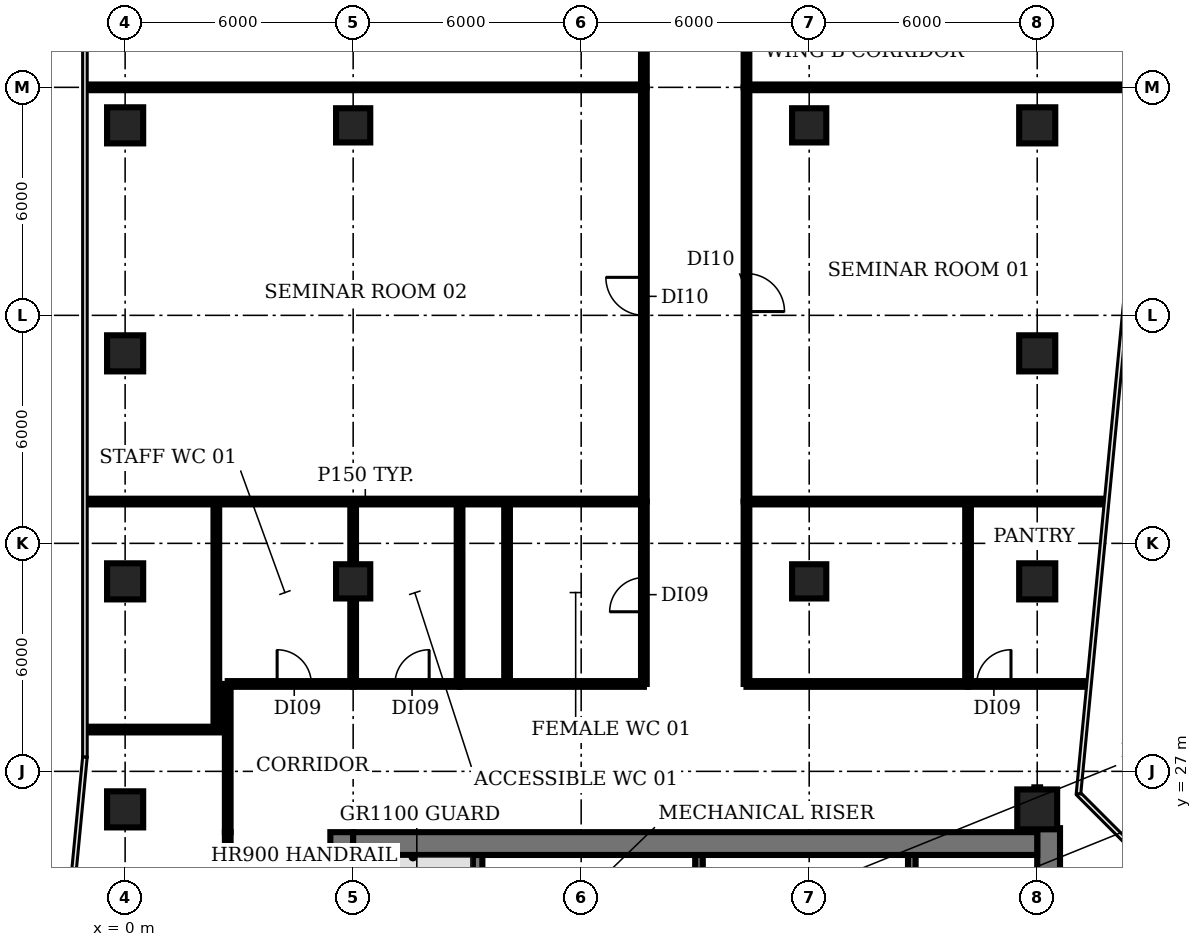
"""IFC4 building model, lengths in metres.
Left out: names, types, materials, properties, quantities, classifications, styles, units other than length and angle.
Written with IfcOpenShell. Run it as: python <this file> out.ifc"""

import sys

from ifc_helpers import new_model, si_unit, direction, frame, frame_2d, origin, origin_2d, place, context, subcontext, project, spatial, rectangle, circle, extrude, element, fill, save


model = new_model("IFC4")
c1 = context("Model", 3, precision=1e-05, world=origin(), true_north=direction((0.0, 1.0)))
c2 = subcontext(c1, "Body", "Model", "MODEL_VIEW")
j1 = project(units=[si_unit("LENGTHUNIT", "METRE"), si_unit("PLANEANGLEUNIT", "RADIAN")], contexts=[c1])
p1 = place(None, origin())
s1 = spatial("IfcSite", under=j1, at=p1, CompositionType="ELEMENT")
p2 = place(p1, origin())
s2 = spatial("IfcBuilding", under=s1, at=p2, CompositionType="ELEMENT")
p3 = place(p2, frame((0.0, 0.0, 146.6)))
s3 = spatial("IfcBuildingStorey", under=s2, at=p3, CompositionType="ELEMENT", Elevation=146.6)
for number, where, z_axis, x_axis in (
    (1, (0.0, 26.0, -0.35), (0.0, 0.0, 1.0), (1.0, 0.0, 0.0)),
    (2, (0.0, 32.0, -0.35), (0.0, 0.0, 1.0), (1.0, 0.0, 0.0)),
    (3, (0.0, 38.0, -0.35), (0.0, 0.0, 1.0), (1.0, 0.0, 0.0)),
    (4, (0.0, 44.0, -0.35), (0.0, 0.0, 1.0), (1.0, 0.0, 0.0)),
):
    element("IfcColumn", number, at=place(p3, frame(where, z_axis=z_axis, x_axis=x_axis)), inside=s3, PredefinedType="COLUMN", context=c2, shape_type="SweptSolid", body=[
        extrude(rectangle(XDim=0.95, YDim=0.95, at=origin_2d()), origin(), (0.0, 0.0, 1.0), 4.2),
    ])
for number, where, z_axis, x_axis in (
    (5, (6.0, 32.0, -0.35), (0.0, 0.0, 1.0), (1.0, 0.0, 0.0)),
    (6, (6.0, 44.0, -0.35), (0.0, 0.0, 1.0), (1.0, 0.0, 0.0)),
    (7, (18.0, 32.0, -0.35), (0.0, 0.0, 1.0), (1.0, 0.0, 0.0)),
    (8, (18.0, 44.0, -0.35), (0.0, 0.0, 1.0), (1.0, 0.0, 0.0)),
):
    element("IfcColumn", number, at=place(p3, frame(where, z_axis=z_axis, x_axis=x_axis)), inside=s3, PredefinedType="COLUMN", context=c2, shape_type="SweptSolid", body=[
        extrude(rectangle(XDim=0.9, YDim=0.9, at=origin_2d()), origin(), (0.0, 0.0, 1.0), 4.2),
    ])
p4 = place(p3, frame((24.0, 26.0, -0.35), z_axis=(0.0, 0.0, 1.0), x_axis=(1.0, 0.0, 0.0)))
e9 = element("IfcColumn", 9, at=p4, inside=s3, PredefinedType="COLUMN", context=c2, shape_type="SweptSolid", body=[
    extrude(circle(Radius=0.525, at=origin_2d()), origin(), (0.0, 0.0, 1.0), 4.2),
])
for number, where, z_axis, x_axis in (
    (10, (24.0, 32.0, -0.35), (0.0, 0.0, 1.0), (1.0, 0.0, 0.0)),
    (11, (24.0, 38.0, -0.35), (0.0, 0.0, 1.0), (1.0, 0.0, 0.0)),
    (12, (24.0, 44.0, -0.35), (0.0, 0.0, 1.0), (1.0, 0.0, 0.0)),
):
    element("IfcColumn", number, at=place(p3, frame(where, z_axis=z_axis, x_axis=x_axis)), inside=s3, PredefinedType="COLUMN", context=c2, shape_type="SweptSolid", body=[
        extrude(rectangle(XDim=0.95, YDim=0.95, at=origin_2d()), origin(), (0.0, 0.0, 1.0), 4.2),
    ])
p5 = place(p3, frame((9.275, 18.375, 0.0), z_axis=(0.0, 0.0, 1.0), x_axis=(0.0, 1.0, 0.0)))
e13 = element("IfcWall", 13, at=p5, inside=s3, PredefinedType="SHEAR", context=c2, shape_type="SweptSolid", body=[
    extrude(rectangle(XDim=6.425, YDim=0.25, at=frame_2d((3.212, 0.0))), origin(), (0.0, 0.0, 1.0), 3.85),
])
for number, where, z_axis, x_axis in (
    (14, (15.1, 22.9, 0.0), (0.0, 0.0, 1.0), (0.0, 1.0, 0.0)),
    (15, (20.7, 22.9, 0.0), (0.0, 0.0, 1.0), (0.0, 1.0, 0.0)),
):
    element("IfcWall", number, at=place(p3, frame(where, z_axis=z_axis, x_axis=x_axis)), inside=s3, PredefinedType="SHEAR", context=c2, shape_type="SweptSolid", body=[
        extrude(rectangle(XDim=1.9, YDim=0.2, at=frame_2d((0.95, 0.0))), origin(), (0.0, 0.0, 1.0), 3.85),
    ])
p6 = place(p3, frame((5.7, 4.8, 0.0), z_axis=(0.0, 0.0, 1.0), x_axis=(0.0, 1.0, 0.0)))
e16 = element("IfcWall", 16, at=p6, inside=s3, PredefinedType="SHEAR", context=c2, shape_type="SweptSolid", body=[
    extrude(rectangle(XDim=20.6, YDim=0.6, at=frame_2d((10.3, 0.0))), origin(), (0.0, 0.0, 1.0), 3.85),
])
p7 = place(p6, frame((0.85, 0.0, 0.0)))
e17 = element("IfcOpeningElement", 17, at=p7, cuts=e16, PredefinedType="OPENING", context=c2, shape_type="SweptSolid", body=[
    extrude(rectangle(XDim=1.5, YDim=2.1, at=frame_2d((0.75, 1.05))), frame((0.0, 0.31, 0.0), z_axis=(0.0, -1.0, 0.0), x_axis=(1.0, 0.0, 0.0)), (0.0, 0.0, 1.0), 0.62),
])
p8 = place(p6, frame((7.3, 0.0, 0.0)))
e18 = element("IfcOpeningElement", 18, at=p8, cuts=e16, PredefinedType="OPENING", context=c2, shape_type="SweptSolid", body=[
    extrude(rectangle(XDim=1.2, YDim=2.1, at=frame_2d((0.6, 1.05))), frame((0.0, 0.31, 0.0), z_axis=(0.0, -1.0, 0.0), x_axis=(1.0, 0.0, 0.0)), (0.0, 0.0, 1.0), 0.62),
])
p9 = place(p6, frame((13.85, 0.0, 0.0)))
e19 = element("IfcOpeningElement", 19, at=p9, cuts=e16, PredefinedType="OPENING", context=c2, shape_type="SweptSolid", body=[
    extrude(rectangle(XDim=1.2, YDim=2.1, at=frame_2d((0.6, 1.05))), frame((0.0, 0.31, 0.0), z_axis=(0.0, -1.0, 0.0), x_axis=(1.0, 0.0, 0.0)), (0.0, 0.0, 1.0), 0.62),
])
p10 = place(p3, frame((24.3, 25.505, 0.0), z_axis=(0.0, 0.0, 1.0), x_axis=(0.0, -1.0, 0.0)))
e20 = element("IfcWall", 20, at=p10, inside=s3, PredefinedType="SHEAR", context=c2, shape_type="SweptSolid", body=[
    extrude(rectangle(XDim=20.705, YDim=0.6, at=frame_2d((10.353, 0.0))), origin(), (0.0, 0.0, 1.0), 3.85),
])
p11 = place(p10, frame((18.355, 0.0, 0.0)))
e21 = element("IfcOpeningElement", 21, at=p11, cuts=e20, PredefinedType="OPENING", context=c2, shape_type="SweptSolid", body=[
    extrude(rectangle(XDim=1.5, YDim=2.1, at=frame_2d((0.75, 1.05))), frame((0.0, 0.31, 0.0), z_axis=(0.0, -1.0, 0.0), x_axis=(1.0, 0.0, 0.0)), (0.0, 0.0, 1.0), 0.62),
])
p12 = place(p10, frame((12.255, 0.0, 0.0)))
e22 = element("IfcOpeningElement", 22, at=p12, cuts=e20, PredefinedType="OPENING", context=c2, shape_type="SweptSolid", body=[
    extrude(rectangle(XDim=0.9, YDim=2.1, at=frame_2d((0.45, 1.05))), frame((0.0, 0.31, 0.0), z_axis=(0.0, -1.0, 0.0), x_axis=(1.0, 0.0, 0.0)), (0.0, 0.0, 1.0), 0.62),
])
p13 = place(p10, frame((6.255, 0.0, 0.0)))
e23 = element("IfcOpeningElement", 23, at=p13, cuts=e20, PredefinedType="OPENING", context=c2, shape_type="SweptSolid", body=[
    extrude(rectangle(XDim=2.0, YDim=2.1, at=frame_2d((1.0, 1.05))), frame((0.0, 0.31, 0.0), z_axis=(0.0, -1.0, 0.0), x_axis=(1.0, 0.0, 0.0)), (0.0, 0.0, 1.0), 0.62),
])
p14 = place(p3, frame((6.0, 25.1, 0.0), z_axis=(0.0, 0.0, 1.0), x_axis=(1.0, 0.0, 0.0)))
e24 = element("IfcWall", 24, at=p14, inside=s3, PredefinedType="SHEAR", context=c2, shape_type="SweptSolid", body=[
    extrude(rectangle(XDim=18.0, YDim=0.6, at=frame_2d((9.0, 0.0))), origin(), (0.0, 0.0, 1.0), 3.85),
])
for number, where, z_axis, x_axis in (
    (25, (-1.01, 34.1, 0.0), (0.0, 0.0, 1.0), (1.0, 0.0, 0.0)),
    (26, (-1.01, 45.0, 0.0), (0.0, 0.0, 1.0), (1.0, 0.0, 0.0)),
):
    element("IfcWall", number, at=place(p3, frame(where, z_axis=z_axis, x_axis=x_axis)), inside=s3, PredefinedType="PARTITIONING", context=c2, shape_type="SweptSolid", body=[
        extrude(rectangle(XDim=14.66, YDim=0.15, at=frame_2d((7.33, 0.0))), origin(), (0.0, 0.0, 1.0), 2.88),
    ])
p15 = place(p3, frame((-0.998, 28.1, 0.0), z_axis=(0.0, 0.0, 1.0), x_axis=(1.0, 0.0, 0.0)))
e27 = element("IfcWall", 27, at=p15, inside=s3, PredefinedType="PARTITIONING", context=c2, shape_type="SweptSolid", body=[
    extrude(rectangle(XDim=3.698, YDim=0.15, at=frame_2d((1.849, 0.0))), origin(), (0.0, 0.0, 1.0), 2.88),
])
p16 = place(p3, frame((2.4, 28.1, 0.0), z_axis=(0.0, 0.0, 1.0), x_axis=(0.0, 1.0, 0.0)))
e28 = element("IfcWall", 28, at=p16, inside=s3, PredefinedType="PARTITIONING", context=c2, shape_type="SweptSolid", body=[
    extrude(rectangle(XDim=6.0, YDim=0.15, at=frame_2d((3.0, 0.0))), origin(), (0.0, 0.0, 1.0), 2.88),
])
p17 = place(p3, frame((2.7, 4.8, 0.0), z_axis=(0.0, 0.0, 1.0), x_axis=(0.0, 1.0, 0.0)))
e29 = element("IfcWall", 29, at=p17, inside=s3, PredefinedType="PARTITIONING", context=c2, shape_type="SweptSolid", body=[
    extrude(rectangle(XDim=20.6, YDim=0.15, at=frame_2d((10.3, 0.0))), origin(), (0.0, 0.0, 1.0), 2.88),
])
p18 = place(p17, frame((10.2, 0.0, 0.0)))
e30 = element("IfcOpeningElement", 30, at=p18, cuts=e29, PredefinedType="OPENING", context=c2, shape_type="SweptSolid", body=[
    extrude(rectangle(XDim=1.2, YDim=2.1, at=frame_2d((0.6, 1.05))), frame((0.0, 0.085, 0.0), z_axis=(0.0, -1.0, 0.0), x_axis=(1.0, 0.0, 0.0)), (0.0, 0.0, 1.0), 0.17),
])
p19 = place(p3, frame((2.7, 25.4, 0.0), z_axis=(0.0, 0.0, 1.0), x_axis=(0.0, 1.0, 0.0)))
e31 = element("IfcWall", 31, at=p19, inside=s3, PredefinedType="PARTITIONING", context=c2, shape_type="SweptSolid", body=[
    extrude(rectangle(XDim=3.9, YDim=0.15, at=frame_2d((1.95, 0.0))), origin(), (0.0, 0.0, 1.0), 2.88),
])
p20 = place(p3, frame((2.7, 29.3, 0.0), z_axis=(0.0, 0.0, 1.0), x_axis=(1.0, 0.0, 0.0)))
e32 = element("IfcWall", 32, at=p20, inside=s3, PredefinedType="PARTITIONING", context=c2, shape_type="SweptSolid", body=[
    extrude(rectangle(XDim=3.3, YDim=0.15, at=frame_2d((1.65, 0.0))), origin(), (0.0, 0.0, 1.0), 2.88),
])
p21 = place(p20, frame((1.3, 0.0, 0.0)))
e33 = element("IfcOpeningElement", 33, at=p21, cuts=e32, PredefinedType="OPENING", context=c2, shape_type="SweptSolid", body=[
    extrude(rectangle(XDim=0.9, YDim=2.1, at=frame_2d((0.45, 1.05))), frame((0.0, 0.085, 0.0), z_axis=(0.0, -1.0, 0.0), x_axis=(1.0, 0.0, 0.0)), (0.0, 0.0, 1.0), 0.17),
])
p22 = place(p3, frame((6.0, 29.3, 0.0), z_axis=(0.0, 0.0, 1.0), x_axis=(0.0, 1.0, 0.0)))
e34 = element("IfcWall", 34, at=p22, inside=s3, PredefinedType="PARTITIONING", context=c2, shape_type="SweptSolid", body=[
    extrude(rectangle(XDim=4.8, YDim=0.15, at=frame_2d((2.4, 0.0))), origin(), (0.0, 0.0, 1.0), 2.88),
])
p23 = place(p3, frame((6.0, 29.3, 0.0), z_axis=(0.0, 0.0, 1.0), x_axis=(1.0, 0.0, 0.0)))
e35 = element("IfcWall", 35, at=p23, inside=s3, PredefinedType="PARTITIONING", context=c2, shape_type="SweptSolid", body=[
    extrude(rectangle(XDim=2.8, YDim=0.15, at=frame_2d((1.4, 0.0))), origin(), (0.0, 0.0, 1.0), 2.88),
])
p24 = place(p23, frame((1.1, 0.0, 0.0)))
e36 = element("IfcOpeningElement", 36, at=p24, cuts=e35, PredefinedType="OPENING", context=c2, shape_type="SweptSolid", body=[
    extrude(rectangle(XDim=0.9, YDim=2.1, at=frame_2d((0.45, 1.05))), frame((0.0, 0.085, 0.0), z_axis=(0.0, -1.0, 0.0), x_axis=(1.0, 0.0, 0.0)), (0.0, 0.0, 1.0), 0.17),
])
p25 = place(p3, frame((8.8, 29.3, 0.0), z_axis=(0.0, 0.0, 1.0), x_axis=(0.0, 1.0, 0.0)))
e37 = element("IfcWall", 37, at=p25, inside=s3, PredefinedType="PARTITIONING", context=c2, shape_type="SweptSolid", body=[
    extrude(rectangle(XDim=4.8, YDim=0.15, at=frame_2d((2.4, 0.0))), origin(), (0.0, 0.0, 1.0), 2.88),
])
p26 = place(p3, frame((8.8, 29.3, 0.0), z_axis=(0.0, 0.0, 1.0), x_axis=(1.0, 0.0, 0.0)))
e38 = element("IfcWall", 38, at=p26, inside=s3, PredefinedType="PARTITIONING", context=c2, shape_type="SweptSolid", body=[
    extrude(rectangle(XDim=4.85, YDim=0.15, at=frame_2d((2.425, 0.0))), origin(), (0.0, 0.0, 1.0), 2.88),
])
p27 = place(p3, frame((10.05, 29.3, 0.0), z_axis=(0.0, 0.0, 1.0), x_axis=(0.0, 1.0, 0.0)))
e39 = element("IfcWall", 39, at=p27, inside=s3, PredefinedType="PARTITIONING", context=c2, shape_type="SweptSolid", body=[
    extrude(rectangle(XDim=4.8, YDim=0.15, at=frame_2d((2.4, 0.0))), origin(), (0.0, 0.0, 1.0), 2.88),
])
p28 = place(p3, frame((13.65, 29.3, 0.0), z_axis=(0.0, 0.0, 1.0), x_axis=(0.0, 1.0, 0.0)))
e40 = element("IfcWall", 40, at=p28, inside=s3, PredefinedType="PARTITIONING", context=c2, shape_type="SweptSolid", body=[
    extrude(rectangle(XDim=4.8, YDim=0.15, at=frame_2d((2.4, 0.0))), origin(), (0.0, 0.0, 1.0), 2.88),
])
p29 = place(p28, frame((1.9, 0.0, 0.0)))
e41 = element("IfcOpeningElement", 41, at=p29, cuts=e40, PredefinedType="OPENING", context=c2, shape_type="SweptSolid", body=[
    extrude(rectangle(XDim=0.9, YDim=2.1, at=frame_2d((0.45, 1.05))), frame((0.0, 0.085, 0.0), z_axis=(0.0, -1.0, 0.0), x_axis=(1.0, 0.0, 0.0)), (0.0, 0.0, 1.0), 0.17),
])
p30 = place(p3, frame((13.65, 34.1, 0.0), z_axis=(0.0, 0.0, 1.0), x_axis=(0.0, 1.0, 0.0)))
e42 = element("IfcWall", 42, at=p30, inside=s3, PredefinedType="PARTITIONING", context=c2, shape_type="SweptSolid", body=[
    extrude(rectangle(XDim=10.9, YDim=0.15, at=frame_2d((5.45, 0.0))), origin(), (0.0, 0.0, 1.0), 2.88),
])
p31 = place(p30, frame((4.9, 0.0, 0.0)))
e43 = element("IfcOpeningElement", 43, at=p31, cuts=e42, PredefinedType="OPENING", context=c2, shape_type="SweptSolid", body=[
    extrude(rectangle(XDim=1.0, YDim=2.1, at=frame_2d((0.5, 1.05))), frame((0.0, 0.085, 0.0), z_axis=(0.0, -1.0, 0.0), x_axis=(1.0, 0.0, 0.0)), (0.0, 0.0, 1.0), 0.17),
])
p32 = place(p3, frame((13.65, 45.0, 0.0), z_axis=(0.0, 0.0, 1.0), x_axis=(0.0, 1.0, 0.0)))
e44 = element("IfcWall", 44, at=p32, inside=s3, PredefinedType="PARTITIONING", context=c2, shape_type="SweptSolid", body=[
    extrude(rectangle(XDim=6.0, YDim=0.15, at=frame_2d((3.0, 0.0))), origin(), (0.0, 0.0, 1.0), 2.88),
])
p33 = place(p32, frame((2.4, 0.0, 0.0)))
e45 = element("IfcOpeningElement", 45, at=p33, cuts=e44, PredefinedType="OPENING", context=c2, shape_type="SweptSolid", body=[
    extrude(rectangle(XDim=1.0, YDim=2.1, at=frame_2d((0.5, 1.05))), frame((0.0, 0.085, 0.0), z_axis=(0.0, -1.0, 0.0), x_axis=(1.0, 0.0, 0.0)), (0.0, 0.0, 1.0), 0.17),
])
p34 = place(p3, frame((16.35, 29.3, 0.0), z_axis=(0.0, 0.0, 1.0), x_axis=(0.0, 1.0, 0.0)))
e46 = element("IfcWall", 46, at=p34, inside=s3, PredefinedType="PARTITIONING", context=c2, shape_type="SweptSolid", body=[
    extrude(rectangle(XDim=4.8, YDim=0.15, at=frame_2d((2.4, 0.0))), origin(), (0.0, 0.0, 1.0), 2.88),
])
p35 = place(p3, frame((16.35, 29.3, 0.0), z_axis=(0.0, 0.0, 1.0), x_axis=(1.0, 0.0, 0.0)))
e47 = element("IfcWall", 47, at=p35, inside=s3, PredefinedType="PARTITIONING", context=c2, shape_type="SweptSolid", body=[
    extrude(rectangle(XDim=5.83, YDim=0.15, at=frame_2d((2.915, 0.0))), origin(), (0.0, 0.0, 1.0), 2.88),
])
p36 = place(p3, frame((16.35, 34.1, 0.0), z_axis=(0.0, 0.0, 1.0), x_axis=(1.0, 0.0, 0.0)))
e48 = element("IfcWall", 48, at=p36, inside=s3, PredefinedType="PARTITIONING", context=c2, shape_type="SweptSolid", body=[
    extrude(rectangle(XDim=9.43, YDim=0.15, at=frame_2d((4.715, 0.0))), origin(), (0.0, 0.0, 1.0), 2.88),
])
p37 = place(p3, frame((16.35, 45.0, 0.0), z_axis=(0.0, 0.0, 1.0), x_axis=(0.0, -1.0, 0.0)))
e49 = element("IfcWall", 49, at=p37, inside=s3, PredefinedType="PARTITIONING", context=c2, shape_type="SweptSolid", body=[
    extrude(rectangle(XDim=10.9, YDim=0.15, at=frame_2d((5.45, 0.0))), origin(), (0.0, 0.0, 1.0), 2.88),
])
p38 = place(p37, frame((4.9, 0.0, 0.0)))
e50 = element("IfcOpeningElement", 50, at=p38, cuts=e49, PredefinedType="OPENING", context=c2, shape_type="SweptSolid", body=[
    extrude(rectangle(XDim=1.0, YDim=2.1, at=frame_2d((0.5, 1.05))), frame((0.0, 0.085, 0.0), z_axis=(0.0, -1.0, 0.0), x_axis=(1.0, 0.0, 0.0)), (0.0, 0.0, 1.0), 0.17),
])
p39 = place(p3, frame((16.35, 45.0, 0.0), z_axis=(0.0, 0.0, 1.0), x_axis=(1.0, 0.0, 0.0)))
e51 = element("IfcWall", 51, at=p39, inside=s3, PredefinedType="PARTITIONING", context=c2, shape_type="SweptSolid", body=[
    extrude(rectangle(XDim=10.48, YDim=0.15, at=frame_2d((5.24, 0.0))), origin(), (0.0, 0.0, 1.0), 2.88),
])
p40 = place(p3, frame((16.35, 51.0, 0.0), z_axis=(0.0, 0.0, 1.0), x_axis=(0.0, -1.0, 0.0)))
e52 = element("IfcWall", 52, at=p40, inside=s3, PredefinedType="PARTITIONING", context=c2, shape_type="SweptSolid", body=[
    extrude(rectangle(XDim=6.0, YDim=0.15, at=frame_2d((3.0, 0.0))), origin(), (0.0, 0.0, 1.0), 2.88),
])
p41 = place(p40, frame((2.4, 0.0, 0.0)))
e53 = element("IfcOpeningElement", 53, at=p41, cuts=e52, PredefinedType="OPENING", context=c2, shape_type="SweptSolid", body=[
    extrude(rectangle(XDim=1.0, YDim=2.1, at=frame_2d((0.5, 1.05))), frame((0.0, 0.085, 0.0), z_axis=(0.0, -1.0, 0.0), x_axis=(1.0, 0.0, 0.0)), (0.0, 0.0, 1.0), 0.17),
])
p42 = place(p3, frame((22.18, 29.3, 0.0), z_axis=(0.0, 0.0, 1.0), x_axis=(0.0, 1.0, 0.0)))
e54 = element("IfcWall", 54, at=p42, inside=s3, PredefinedType="PARTITIONING", context=c2, shape_type="SweptSolid", body=[
    extrude(rectangle(XDim=4.8, YDim=0.15, at=frame_2d((2.4, 0.0))), origin(), (0.0, 0.0, 1.0), 2.88),
])
p43 = place(p3, frame((22.18, 29.3, 0.0), z_axis=(0.0, 0.0, 1.0), x_axis=(1.0, 0.0, 0.0)))
e55 = element("IfcWall", 55, at=p43, inside=s3, PredefinedType="PARTITIONING", context=c2, shape_type="SweptSolid", body=[
    extrude(rectangle(XDim=3.13, YDim=0.15, at=frame_2d((1.565, 0.0))), origin(), (0.0, 0.0, 1.0), 2.88),
])
p44 = place(p43, frame((0.23, 0.0, 0.0)))
e56 = element("IfcOpeningElement", 56, at=p44, cuts=e55, PredefinedType="OPENING", context=c2, shape_type="SweptSolid", body=[
    extrude(rectangle(XDim=0.9, YDim=2.1, at=frame_2d((0.45, 1.05))), frame((0.0, 0.085, 0.0), z_axis=(0.0, -1.0, 0.0), x_axis=(1.0, 0.0, 0.0)), (0.0, 0.0, 1.0), 0.17),
])
p45 = place(p3, frame((24.0, 25.5, 0.0), z_axis=(0.0, 0.0, 1.0), x_axis=(0.0, 1.0, 0.0)))
e57 = element("IfcWall", 57, at=p45, inside=s3, PredefinedType="PARTITIONING", context=c2, shape_type="SweptSolid", body=[
    extrude(rectangle(XDim=1.08, YDim=0.15, at=frame_2d((0.54, 0.0))), origin(), (0.0, 0.0, 1.0), 2.88),
])
p46 = place(p21, origin())
e58 = element("IfcDoor", 58, at=p46, inside=s3, OperationType="SINGLE_SWING_LEFT", PredefinedType="DOOR", context=c2, shape_type="SweptSolid", body=[
    extrude(rectangle(XDim=0.9, YDim=2.1, at=frame_2d((0.45, 1.05))), frame((0.0, 0.025, 0.0), z_axis=(0.0, -1.0, 0.0), x_axis=(1.0, 0.0, 0.0)), (0.0, 0.0, 1.0), 0.05),
])
fill(e33, e58)
p47 = place(p24, origin())
e59 = element("IfcDoor", 59, at=p47, inside=s3, OperationType="SINGLE_SWING_RIGHT", PredefinedType="DOOR", context=c2, shape_type="SweptSolid", body=[
    extrude(rectangle(XDim=0.9, YDim=2.1, at=frame_2d((0.45, 1.05))), frame((0.0, 0.025, 0.0), z_axis=(0.0, -1.0, 0.0), x_axis=(1.0, 0.0, 0.0)), (0.0, 0.0, 1.0), 0.05),
])
fill(e36, e59)
p48 = place(p29, origin())
e60 = element("IfcDoor", 60, at=p48, inside=s3, OperationType="SINGLE_SWING_LEFT", PredefinedType="DOOR", context=c2, shape_type="SweptSolid", body=[
    extrude(rectangle(XDim=0.9, YDim=2.1, at=frame_2d((0.45, 1.05))), frame((0.0, 0.025, 0.0), z_axis=(0.0, -1.0, 0.0), x_axis=(1.0, 0.0, 0.0)), (0.0, 0.0, 1.0), 0.05),
])
fill(e41, e60)
p49 = place(p31, origin())
e61 = element("IfcDoor", 61, at=p49, inside=s3, OperationType="SINGLE_SWING_RIGHT", PredefinedType="DOOR", context=c2, shape_type="SweptSolid", body=[
    extrude(rectangle(XDim=1.0, YDim=2.1, at=frame_2d((0.5, 1.05))), frame((0.0, 0.025, 0.0), z_axis=(0.0, -1.0, 0.0), x_axis=(1.0, 0.0, 0.0)), (0.0, 0.0, 1.0), 0.05),
])
fill(e43, e61)
p50 = place(p38, origin())
e62 = element("IfcDoor", 62, at=p50, inside=s3, OperationType="SINGLE_SWING_RIGHT", PredefinedType="DOOR", context=c2, shape_type="SweptSolid", body=[
    extrude(rectangle(XDim=1.0, YDim=2.1, at=frame_2d((0.5, 1.05))), frame((0.0, 0.025, 0.0), z_axis=(0.0, -1.0, 0.0), x_axis=(1.0, 0.0, 0.0)), (0.0, 0.0, 1.0), 0.05),
])
fill(e50, e62)
p51 = place(p44, origin())
e63 = element("IfcDoor", 63, at=p51, inside=s3, OperationType="SINGLE_SWING_RIGHT", PredefinedType="DOOR", context=c2, shape_type="SweptSolid", body=[
    extrude(rectangle(XDim=0.9, YDim=2.1, at=frame_2d((0.45, 1.05))), frame((0.0, 0.025, 0.0), z_axis=(0.0, -1.0, 0.0), x_axis=(1.0, 0.0, 0.0)), (0.0, 0.0, 1.0), 0.05),
])
fill(e56, e63)
save(model, sys.argv[1])
